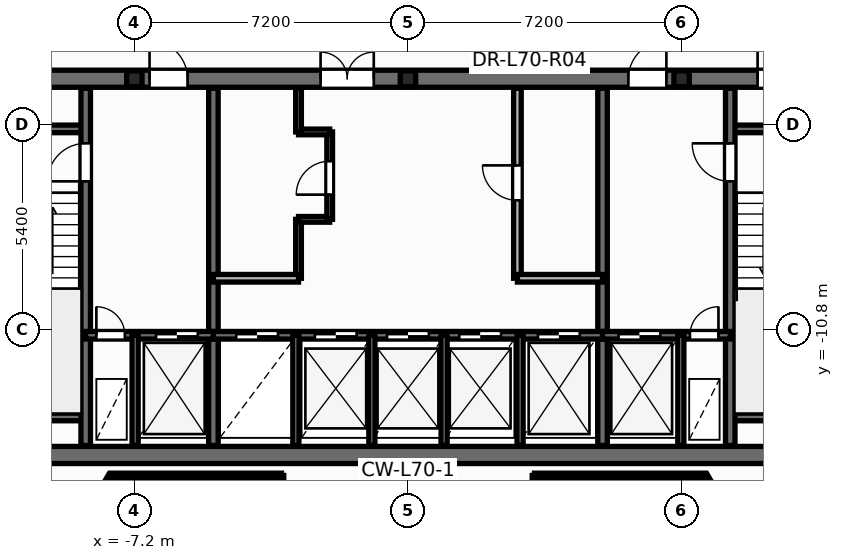
"""IFC4 building model, lengths in metres.
Left out: names, types, materials, properties, quantities, classifications, styles, units other than length and angle.
Written with IfcOpenShell. Run it as: python <this file> out.ifc"""

import sys

from ifc_helpers import new_model, si_unit, direction, frame, frame_2d, origin, origin_2d, place, context, subcontext, project, spatial, rectangle, i_section, extrude, element, fill, save


model = new_model("IFC4")
c1 = context("Model", 3, precision=1e-05, world=origin(), true_north=direction((0.0, 1.0)))
c2 = subcontext(c1, "Body", "Model", "MODEL_VIEW")
j1 = project(units=[si_unit("LENGTHUNIT", "METRE"), si_unit("PLANEANGLEUNIT", "RADIAN")], contexts=[c1])
p1 = place(None, origin())
s1 = spatial("IfcSite", under=j1, at=p1, CompositionType="ELEMENT")
p2 = place(p1, origin())
s2 = spatial("IfcBuilding", under=s1, at=p2, CompositionType="ELEMENT")
p3 = place(p2, frame((0.0, 0.0, 267.0)))
s3 = spatial("IfcBuildingStorey", under=s2, at=p3, CompositionType="ELEMENT", Elevation=267.0)
for number, where, z_axis, x_axis in (
    (1, (-7.2, -4.2, 0.0), (0.0, 0.0, 1.0), (1.0, 0.0, 0.0)),
    (2, (0.0, -4.2, 0.0), (0.0, 0.0, 1.0), (1.0, 0.0, 0.0)),
    (3, (7.2, -4.2, 0.0), (0.0, 0.0, 1.0), (1.0, 0.0, 0.0)),
):
    element("IfcColumn", number, at=place(p3, frame(where, z_axis=z_axis, x_axis=x_axis)), inside=s3, PredefinedType="PILASTER", context=c2, shape_type="SweptSolid", body=[
        extrude(i_section(OverallWidth=0.405, OverallDepth=0.414, WebThickness=0.022, FlangeThickness=0.032, at=origin_2d()), origin(), (0.0, 0.0, 1.0), 3.6),
    ])
p4 = place(p3, frame((-2.88, -9.45, 0.0), z_axis=(0.0, 0.0, 1.0), x_axis=(0.0, 1.0, 0.0)))
e4 = element("IfcWall", 4, at=p4, inside=s3, PredefinedType="PARTITIONING", context=c2, shape_type="SweptSolid", body=[
    extrude(rectangle(XDim=1.55, YDim=0.15, at=frame_2d((0.775, 0.0))), origin(), (0.0, 0.0, 1.0), 3.345),
])
p5 = place(p3, frame((-2.88, -7.9, 0.0), z_axis=(0.0, 0.0, 1.0), x_axis=(1.0, 0.0, 0.0)))
e5 = element("IfcWall", 5, at=p5, inside=s3, PredefinedType="PARTITIONING", context=c2, shape_type="SweptSolid", body=[
    extrude(rectangle(XDim=0.82, YDim=0.15, at=frame_2d((0.41, 0.0))), origin(), (0.0, 0.0, 1.0), 3.345),
])
p6 = place(p3, frame((-2.06, -7.9, 0.0), z_axis=(0.0, 0.0, 1.0), x_axis=(0.0, 1.0, 0.0)))
e6 = element("IfcWall", 6, at=p6, inside=s3, PredefinedType="PARTITIONING", context=c2, shape_type="SweptSolid", body=[
    extrude(rectangle(XDim=2.3, YDim=0.15, at=frame_2d((1.15, 0.0))), origin(), (0.0, 0.0, 1.0), 3.345),
])
p7 = place(p6, frame((0.65, 0.0, 0.0)))
e7 = element("IfcOpeningElement", 7, at=p7, cuts=e6, PredefinedType="OPENING", context=c2, shape_type="SweptSolid", body=[
    extrude(rectangle(XDim=0.886, YDim=2.104, at=frame_2d((0.44, 1.052))), frame((0.0, 0.085, 0.0), z_axis=(0.0, -1.0, 0.0), x_axis=(1.0, 0.0, 0.0)), (0.0, 0.0, 1.0), 0.17),
])
p8 = place(p3, frame((-2.88, -5.6, 0.0), z_axis=(0.0, 0.0, 1.0), x_axis=(1.0, 0.0, 0.0)))
e8 = element("IfcWall", 8, at=p8, inside=s3, PredefinedType="PARTITIONING", context=c2, shape_type="SweptSolid", body=[
    extrude(rectangle(XDim=0.82, YDim=0.15, at=frame_2d((0.41, 0.0))), origin(), (0.0, 0.0, 1.0), 3.345),
])
p9 = place(p3, frame((-2.88, -5.6, 0.0), z_axis=(0.0, 0.0, 1.0), x_axis=(0.0, 1.0, 0.0)))
e9 = element("IfcWall", 9, at=p9, inside=s3, PredefinedType="PARTITIONING", context=c2, shape_type="SweptSolid", body=[
    extrude(rectangle(XDim=1.15, YDim=0.15, at=frame_2d((0.575, 0.0))), origin(), (0.0, 0.0, 1.0), 3.345),
])
p10 = place(p3, frame((-12.65, -14.1, 0.0), z_axis=(0.0, 0.0, 1.0), x_axis=(1.0, 0.0, 0.0)))
e10 = element("IfcWall", 10, at=p10, inside=s3, PredefinedType="SHEAR", context=c2, shape_type="SweptSolid", body=[
    extrude(rectangle(XDim=25.3, YDim=0.45, at=frame_2d((12.65, 0.0))), origin(), (0.0, 0.0, 1.0), 3.6),
])
p11 = place(p3, frame((-12.65, -4.2, 0.0), z_axis=(0.0, 0.0, 1.0), x_axis=(1.0, 0.0, 0.0)))
e11 = element("IfcWall", 11, at=p11, inside=s3, PredefinedType="SHEAR", context=c2, shape_type="SweptSolid", body=[
    extrude(rectangle(XDim=25.3, YDim=0.45, at=frame_2d((12.65, 0.0))), origin(), (0.0, 0.0, 1.0), 3.6),
])
p12 = place(p11, frame((1.85, 0.0, 0.0)))
e12 = element("IfcOpeningElement", 12, at=p12, cuts=e11, PredefinedType="OPENING", context=c2, shape_type="SweptSolid", body=[
    extrude(rectangle(XDim=0.756, YDim=2.054, at=frame_2d((0.375, 1.027))), frame((0.0, 0.235, 0.0), z_axis=(0.0, -1.0, 0.0), x_axis=(1.0, 0.0, 0.0)), (0.0, 0.0, 1.0), 0.47),
])
p13 = place(p11, frame((21.85, 0.0, 0.0)))
e13 = element("IfcOpeningElement", 13, at=p13, cuts=e11, PredefinedType="OPENING", context=c2, shape_type="SweptSolid", body=[
    extrude(rectangle(XDim=0.756, YDim=2.054, at=frame_2d((0.375, 1.027))), frame((0.0, 0.235, 0.0), z_axis=(0.0, -1.0, 0.0), x_axis=(1.0, 0.0, 0.0)), (0.0, 0.0, 1.0), 0.47),
])
p14 = place(p11, frame((23.5, 0.0, 0.0)))
e14 = element("IfcOpeningElement", 14, at=p14, cuts=e11, PredefinedType="OPENING", context=c2, shape_type="SweptSolid", body=[
    extrude(rectangle(XDim=0.756, YDim=2.054, at=frame_2d((0.375, 1.027))), frame((0.0, 0.235, 0.0), z_axis=(0.0, -1.0, 0.0), x_axis=(1.0, 0.0, 0.0)), (0.0, 0.0, 1.0), 0.47),
])
p15 = place(p11, frame((5.85, 0.0, 0.0)))
e15 = element("IfcOpeningElement", 15, at=p15, cuts=e11, PredefinedType="OPENING", context=c2, shape_type="SweptSolid", body=[
    extrude(rectangle(XDim=1.006, YDim=2.104, at=frame_2d((0.5, 1.052))), frame((0.0, 0.235, 0.0), z_axis=(0.0, -1.0, 0.0), x_axis=(1.0, 0.0, 0.0)), (0.0, 0.0, 1.0), 0.47),
])
p16 = place(p11, frame((10.35, 0.0, 0.0)))
e16 = element("IfcOpeningElement", 16, at=p16, cuts=e11, PredefinedType="OPENING", context=c2, shape_type="SweptSolid", body=[
    extrude(rectangle(XDim=1.406, YDim=2.154, at=frame_2d((0.7, 1.077))), frame((0.0, 0.235, 0.0), z_axis=(0.0, -1.0, 0.0), x_axis=(1.0, 0.0, 0.0)), (0.0, 0.0, 1.0), 0.47),
])
p17 = place(p11, frame((18.45, 0.0, 0.0)))
e17 = element("IfcOpeningElement", 17, at=p17, cuts=e11, PredefinedType="OPENING", context=c2, shape_type="SweptSolid", body=[
    extrude(rectangle(XDim=1.006, YDim=2.104, at=frame_2d((0.5, 1.052))), frame((0.0, 0.235, 0.0), z_axis=(0.0, -1.0, 0.0), x_axis=(1.0, 0.0, 0.0)), (0.0, 0.0, 1.0), 0.47),
])
for number, where, z_axis, x_axis in (
    (18, (-12.35, -5.52, 0.0), (0.0, 0.0, 1.0), (1.0, 0.0, 0.0)),
    (19, (-12.35, -13.1, 0.0), (0.0, 0.0, 1.0), (1.0, 0.0, 0.0)),
    (20, (8.48, -5.52, 0.0), (0.0, 0.0, 1.0), (1.0, 0.0, 0.0)),
    (21, (8.48, -13.1, 0.0), (0.0, 0.0, 1.0), (1.0, 0.0, 0.0)),
):
    element("IfcWall", number, at=place(p3, frame(where, z_axis=z_axis, x_axis=x_axis)), inside=s3, PredefinedType="SOLIDWALL", context=c2, shape_type="SweptSolid", body=[
        extrude(rectangle(XDim=3.87, YDim=0.2, at=frame_2d((1.935, 0.0))), origin(), (0.0, 0.0, 1.0), 3.6),
    ])
p18 = place(p3, frame((-8.48, -13.85, 0.0), z_axis=(0.0, 0.0, 1.0), x_axis=(0.0, 1.0, 0.0)))
e22 = element("IfcWall", 22, at=p18, inside=s3, PredefinedType="SHEAR", context=c2, shape_type="SweptSolid", body=[
    extrude(rectangle(XDim=9.4, YDim=0.25, at=frame_2d((4.7, 0.0))), origin(), (0.0, 0.0, 1.0), 3.6),
])
p19 = place(p18, frame((6.95, 0.0, 0.0)))
e23 = element("IfcOpeningElement", 23, at=p19, cuts=e22, PredefinedType="OPENING", context=c2, shape_type="SweptSolid", body=[
    extrude(rectangle(XDim=1.006, YDim=2.104, at=frame_2d((0.5, 1.052))), frame((0.0, 0.135, 0.0), z_axis=(0.0, -1.0, 0.0), x_axis=(1.0, 0.0, 0.0)), (0.0, 0.0, 1.0), 0.27),
])
p20 = place(p3, frame((8.48, -13.85, 0.0), z_axis=(0.0, 0.0, 1.0), x_axis=(0.0, 1.0, 0.0)))
e24 = element("IfcWall", 24, at=p20, inside=s3, PredefinedType="SHEAR", context=c2, shape_type="SweptSolid", body=[
    extrude(rectangle(XDim=9.4, YDim=0.25, at=frame_2d((4.7, 0.0))), origin(), (0.0, 0.0, 1.0), 3.6),
])
p21 = place(p20, frame((6.95, 0.0, 0.0)))
e25 = element("IfcOpeningElement", 25, at=p21, cuts=e24, PredefinedType="OPENING", context=c2, shape_type="SweptSolid", body=[
    extrude(rectangle(XDim=1.006, YDim=2.104, at=frame_2d((0.5, 1.052))), frame((0.0, 0.135, 0.0), z_axis=(0.0, -1.0, 0.0), x_axis=(1.0, 0.0, 0.0)), (0.0, 0.0, 1.0), 0.27),
])
for number, where, z_axis, x_axis in (
    (26, (-5.12, -13.85, 0.0), (0.0, 0.0, 1.0), (0.0, 1.0, 0.0)),
    (27, (5.12, -13.85, 0.0), (0.0, 0.0, 1.0), (0.0, 1.0, 0.0)),
):
    element("IfcWall", number, at=place(p3, frame(where, z_axis=z_axis, x_axis=x_axis)), inside=s3, PredefinedType="SHEAR", context=c2, shape_type="SweptSolid", body=[
        extrude(rectangle(XDim=9.4, YDim=0.25, at=frame_2d((4.7, 0.0))), origin(), (0.0, 0.0, 1.0), 3.6),
    ])
p22 = place(p3, frame((-8.48, -10.95, 0.0), z_axis=(0.0, 0.0, 1.0), x_axis=(1.0, 0.0, 0.0)))
e28 = element("IfcWall", 28, at=p22, inside=s3, PredefinedType="SOLIDWALL", context=c2, shape_type="SweptSolid", body=[
    extrude(rectangle(XDim=3.36, YDim=0.2, at=frame_2d((1.68, 0.0))), origin(), (0.0, 0.0, 1.0), 3.6),
])
p23 = place(p22, frame((0.28, 0.0, 0.0)))
e29 = element("IfcOpeningElement", 29, at=p23, cuts=e28, PredefinedType="OPENING", context=c2, shape_type="SweptSolid", body=[
    extrude(rectangle(XDim=0.756, YDim=2.054, at=frame_2d((0.375, 1.027))), frame((0.0, 0.11, 0.0), z_axis=(0.0, -1.0, 0.0), x_axis=(1.0, 0.0, 0.0)), (0.0, 0.0, 1.0), 0.22),
])
p24 = place(p22, frame((1.85, 0.0, 0.0)))
e30 = element("IfcOpeningElement", 30, at=p24, cuts=e28, PredefinedType="OPENING", context=c2, shape_type="SweptSolid", body=[
    extrude(rectangle(XDim=1.106, YDim=2.104, at=frame_2d((0.55, 1.052))), frame((0.0, 0.11, 0.0), z_axis=(0.0, -1.0, 0.0), x_axis=(1.0, 0.0, 0.0)), (0.0, 0.0, 1.0), 0.22),
])
p25 = place(p3, frame((-5.12, -10.95, 0.0), z_axis=(0.0, 0.0, 1.0), x_axis=(1.0, 0.0, 0.0)))
e31 = element("IfcWall", 31, at=p25, inside=s3, PredefinedType="SOLIDWALL", context=c2, shape_type="SweptSolid", body=[
    extrude(rectangle(XDim=10.24, YDim=0.2, at=frame_2d((5.12, 0.0))), origin(), (0.0, 0.0, 1.0), 3.6),
])
p26 = place(p25, frame((0.6, 0.0, 0.0)))
e32 = element("IfcOpeningElement", 32, at=p26, cuts=e31, PredefinedType="OPENING", context=c2, shape_type="SweptSolid", body=[
    extrude(rectangle(XDim=1.106, YDim=2.104, at=frame_2d((0.55, 1.052))), frame((0.0, 0.11, 0.0), z_axis=(0.0, -1.0, 0.0), x_axis=(1.0, 0.0, 0.0)), (0.0, 0.0, 1.0), 0.22),
])
p27 = place(p25, frame((2.67, 0.0, 0.0)))
e33 = element("IfcOpeningElement", 33, at=p27, cuts=e31, PredefinedType="OPENING", context=c2, shape_type="SweptSolid", body=[
    extrude(rectangle(XDim=1.106, YDim=2.104, at=frame_2d((0.55, 1.052))), frame((0.0, 0.11, 0.0), z_axis=(0.0, -1.0, 0.0), x_axis=(1.0, 0.0, 0.0)), (0.0, 0.0, 1.0), 0.22),
])
p28 = place(p25, frame((4.57, 0.0, 0.0)))
e34 = element("IfcOpeningElement", 34, at=p28, cuts=e31, PredefinedType="OPENING", context=c2, shape_type="SweptSolid", body=[
    extrude(rectangle(XDim=1.106, YDim=2.104, at=frame_2d((0.55, 1.052))), frame((0.0, 0.11, 0.0), z_axis=(0.0, -1.0, 0.0), x_axis=(1.0, 0.0, 0.0)), (0.0, 0.0, 1.0), 0.22),
])
p29 = place(p25, frame((6.47, 0.0, 0.0)))
e35 = element("IfcOpeningElement", 35, at=p29, cuts=e31, PredefinedType="OPENING", context=c2, shape_type="SweptSolid", body=[
    extrude(rectangle(XDim=1.106, YDim=2.104, at=frame_2d((0.55, 1.052))), frame((0.0, 0.11, 0.0), z_axis=(0.0, -1.0, 0.0), x_axis=(1.0, 0.0, 0.0)), (0.0, 0.0, 1.0), 0.22),
])
p30 = place(p25, frame((8.54, 0.0, 0.0)))
e36 = element("IfcOpeningElement", 36, at=p30, cuts=e31, PredefinedType="OPENING", context=c2, shape_type="SweptSolid", body=[
    extrude(rectangle(XDim=1.106, YDim=2.104, at=frame_2d((0.55, 1.052))), frame((0.0, 0.11, 0.0), z_axis=(0.0, -1.0, 0.0), x_axis=(1.0, 0.0, 0.0)), (0.0, 0.0, 1.0), 0.22),
])
p31 = place(p3, frame((5.12, -10.95, 0.0), z_axis=(0.0, 0.0, 1.0), x_axis=(1.0, 0.0, 0.0)))
e37 = element("IfcWall", 37, at=p31, inside=s3, PredefinedType="SOLIDWALL", context=c2, shape_type="SweptSolid", body=[
    extrude(rectangle(XDim=3.36, YDim=0.2, at=frame_2d((1.68, 0.0))), origin(), (0.0, 0.0, 1.0), 3.6),
])
p32 = place(p31, frame((0.42, 0.0, 0.0)))
e38 = element("IfcOpeningElement", 38, at=p32, cuts=e37, PredefinedType="OPENING", context=c2, shape_type="SweptSolid", body=[
    extrude(rectangle(XDim=1.106, YDim=2.104, at=frame_2d((0.55, 1.052))), frame((0.0, 0.11, 0.0), z_axis=(0.0, -1.0, 0.0), x_axis=(1.0, 0.0, 0.0)), (0.0, 0.0, 1.0), 0.22),
])
p33 = place(p31, frame((2.3, 0.0, 0.0)))
e39 = element("IfcOpeningElement", 39, at=p33, cuts=e37, PredefinedType="OPENING", context=c2, shape_type="SweptSolid", body=[
    extrude(rectangle(XDim=0.756, YDim=2.054, at=frame_2d((0.375, 1.027))), frame((0.0, 0.11, 0.0), z_axis=(0.0, -1.0, 0.0), x_axis=(1.0, 0.0, 0.0)), (0.0, 0.0, 1.0), 0.22),
])
for number, where, z_axis, x_axis in (
    (40, (-7.18, -13.85, 0.0), (0.0, 0.0, 1.0), (0.0, 1.0, 0.0)),
    (41, (7.18, -13.85, 0.0), (0.0, 0.0, 1.0), (0.0, 1.0, 0.0)),
    (42, (-2.95, -13.85, 0.0), (0.0, 0.0, 1.0), (0.0, 1.0, 0.0)),
    (43, (2.95, -13.85, 0.0), (0.0, 0.0, 1.0), (0.0, 1.0, 0.0)),
):
    element("IfcWall", number, at=place(p3, frame(where, z_axis=z_axis, x_axis=x_axis)), inside=s3, PredefinedType="PARTITIONING", context=c2, shape_type="SweptSolid", body=[
        extrude(rectangle(XDim=2.9, YDim=0.16, at=frame_2d((1.45, 0.0))), origin(), (0.0, 0.0, 1.0), 2.57),
    ])
p34 = place(p3, frame((-5.12, -9.45, 0.0), z_axis=(0.0, 0.0, 1.0), x_axis=(1.0, 0.0, 0.0)))
e44 = element("IfcWall", 44, at=p34, inside=s3, PredefinedType="SOLIDWALL", context=c2, shape_type="SweptSolid", body=[
    extrude(rectangle(XDim=2.24, YDim=0.2, at=frame_2d((1.12, 0.0))), origin(), (0.0, 0.0, 1.0), 3.345),
])
p35 = place(p3, frame((2.88, -9.45, 0.0), z_axis=(0.0, 0.0, 1.0), x_axis=(0.0, 1.0, 0.0)))
e45 = element("IfcWall", 45, at=p35, inside=s3, PredefinedType="SOLIDWALL", context=c2, shape_type="SweptSolid", body=[
    extrude(rectangle(XDim=5.0, YDim=0.2, at=frame_2d((2.5, 0.0))), origin(), (0.0, 0.0, 1.0), 3.345),
])
p36 = place(p35, frame((2.05, 0.0, 0.0)))
e46 = element("IfcOpeningElement", 46, at=p36, cuts=e45, PredefinedType="OPENING", context=c2, shape_type="SweptSolid", body=[
    extrude(rectangle(XDim=0.926, YDim=2.104, at=frame_2d((0.46, 1.052))), frame((0.0, 0.11, 0.0), z_axis=(0.0, -1.0, 0.0), x_axis=(1.0, 0.0, 0.0)), (0.0, 0.0, 1.0), 0.22),
])
p37 = place(p3, frame((2.88, -9.45, 0.0), z_axis=(0.0, 0.0, 1.0), x_axis=(1.0, 0.0, 0.0)))
e47 = element("IfcWall", 47, at=p37, inside=s3, PredefinedType="SOLIDWALL", context=c2, shape_type="SweptSolid", body=[
    extrude(rectangle(XDim=2.24, YDim=0.2, at=frame_2d((1.12, 0.0))), origin(), (0.0, 0.0, 1.0), 3.345),
])
for number, where, z_axis, x_axis in (
    (48, (-0.95, -13.85, 0.0), (0.0, 0.0, 1.0), (0.0, 1.0, 0.0)),
    (49, (0.95, -13.85, 0.0), (0.0, 0.0, 1.0), (0.0, 1.0, 0.0)),
):
    element("IfcWall", number, at=place(p3, frame(where, z_axis=z_axis, x_axis=x_axis)), inside=s3, PredefinedType="PARTITIONING", context=c2, shape_type="SweptSolid", body=[
        extrude(rectangle(XDim=2.9, YDim=0.16, at=frame_2d((1.45, 0.0))), origin(), (0.0, 0.0, 1.0), 2.57),
    ])
for number, where, z_axis, x_axis in (
    (50, (-7.822, -14.639, 0.0), (0.0, 0.0, 1.0), (1.0, 0.0, 0.0)),
    (51, (3.329, -14.639, 0.0), (0.0, 0.0, 1.0), (1.0, 0.0, 0.0)),
):
    element("IfcWall", number, at=place(p3, frame(where, z_axis=z_axis, x_axis=x_axis)), inside=s3, PredefinedType="PARTITIONING", context=c2, shape_type="SweptSolid", body=[
        extrude(rectangle(XDim=4.493, YDim=0.12, at=frame_2d((2.247, 0.0))), origin(), (0.0, 0.0, 1.0), 3.345),
    ])
for number, where, z_axis, x_axis in (
    (52, (-8.214, -15.309, 0.0), (0.0, 0.0, 1.0), (0.505, 0.863, 0.0)),
    (53, (7.822, -14.639, 0.0), (0.0, 0.0, 1.0), (0.505, -0.863, 0.0)),
):
    element("IfcWall", number, at=place(p3, frame(where, z_axis=z_axis, x_axis=x_axis)), inside=s3, PredefinedType="PARTITIONING", context=c2, shape_type="SweptSolid", body=[
        extrude(rectangle(XDim=0.776, YDim=0.12, at=frame_2d((0.388, 0.0))), origin(), (0.0, 0.0, 1.0), 2.863),
    ])
for number, where, z_axis, x_axis in (
    (54, (-3.329, -14.639, 0.0), (0.0, 0.0, 1.0), (0.0, -1.0, 0.0)),
    (55, (3.329, -15.309, 0.0), (0.0, 0.0, 1.0), (0.0, 1.0, 0.0)),
):
    element("IfcWall", number, at=place(p3, frame(where, z_axis=z_axis, x_axis=x_axis)), inside=s3, PredefinedType="PARTITIONING", context=c2, shape_type="SweptSolid", body=[
        extrude(rectangle(XDim=0.67, YDim=0.12, at=frame_2d((0.335, 0.0))), origin(), (0.0, 0.0, 1.0), 2.863),
    ])
p38 = place(p7, origin())
e56 = element("IfcDoor", 56, at=p38, inside=s3, OperationType="SINGLE_SWING_LEFT", PredefinedType="DOOR", context=c2, shape_type="SweptSolid", body=[
    extrude(rectangle(XDim=0.88, YDim=2.1, at=frame_2d((0.44, 1.05))), frame((0.0, 0.025, 0.0), z_axis=(0.0, -1.0, 0.0), x_axis=(1.0, 0.0, 0.0)), (0.0, 0.0, 1.0), 0.05),
])
fill(e7, e56)
p39 = place(p36, origin())
e57 = element("IfcDoor", 57, at=p39, inside=s3, OperationType="SINGLE_SWING_RIGHT", PredefinedType="DOOR", context=c2, shape_type="SweptSolid", body=[
    extrude(rectangle(XDim=0.92, YDim=2.1, at=frame_2d((0.46, 1.05))), frame((0.0, 0.025, 0.0), z_axis=(0.0, -1.0, 0.0), x_axis=(1.0, 0.0, 0.0)), (0.0, 0.0, 1.0), 0.05),
])
fill(e46, e57)
p40 = place(p19, origin())
e58 = element("IfcDoor", 58, at=p40, inside=s3, OperationType="SINGLE_SWING_LEFT", PredefinedType="DOOR", context=c2, shape_type="SweptSolid", body=[
    extrude(rectangle(XDim=1.0, YDim=2.1, at=frame_2d((0.5, 1.05))), frame((0.0, 0.025, 0.0), z_axis=(0.0, -1.0, 0.0), x_axis=(1.0, 0.0, 0.0)), (0.0, 0.0, 1.0), 0.05),
])
fill(e23, e58)
p41 = place(p21, origin())
e59 = element("IfcDoor", 59, at=p41, inside=s3, OperationType="SINGLE_SWING_RIGHT", PredefinedType="DOOR", context=c2, shape_type="SweptSolid", body=[
    extrude(rectangle(XDim=1.0, YDim=2.1, at=frame_2d((0.5, 1.05))), frame((0.0, 0.025, 0.0), z_axis=(0.0, -1.0, 0.0), x_axis=(1.0, 0.0, 0.0)), (0.0, 0.0, 1.0), 0.05),
])
fill(e25, e59)
p42 = place(p23, origin())
e60 = element("IfcDoor", 60, at=p42, inside=s3, OperationType="SINGLE_SWING_LEFT", PredefinedType="DOOR", context=c2, shape_type="SweptSolid", body=[
    extrude(rectangle(XDim=0.75, YDim=2.05, at=frame_2d((0.375, 1.025))), frame((0.0, 0.025, 0.0), z_axis=(0.0, -1.0, 0.0), x_axis=(1.0, 0.0, 0.0)), (0.0, 0.0, 1.0), 0.05),
])
fill(e29, e60)
p43 = place(p24, origin())
e61 = element("IfcDoor", 61, at=p43, inside=s3, OperationType="DOUBLE_DOOR_SLIDING", PredefinedType="DOOR", context=c2, shape_type="SweptSolid", body=[
    extrude(rectangle(XDim=1.1, YDim=2.1, at=frame_2d((0.55, 1.05))), frame((0.0, 0.025, 0.0), z_axis=(0.0, -1.0, 0.0), x_axis=(1.0, 0.0, 0.0)), (0.0, 0.0, 1.0), 0.05),
])
fill(e30, e61)
p44 = place(p32, origin())
e62 = element("IfcDoor", 62, at=p44, inside=s3, OperationType="DOUBLE_DOOR_SLIDING", PredefinedType="DOOR", context=c2, shape_type="SweptSolid", body=[
    extrude(rectangle(XDim=1.1, YDim=2.1, at=frame_2d((0.55, 1.05))), frame((0.0, 0.025, 0.0), z_axis=(0.0, -1.0, 0.0), x_axis=(1.0, 0.0, 0.0)), (0.0, 0.0, 1.0), 0.05),
])
fill(e38, e62)
p45 = place(p33, origin())
e63 = element("IfcDoor", 63, at=p45, inside=s3, OperationType="SINGLE_SWING_RIGHT", PredefinedType="DOOR", context=c2, shape_type="SweptSolid", body=[
    extrude(rectangle(XDim=0.75, YDim=2.05, at=frame_2d((0.375, 1.025))), frame((0.0, 0.025, 0.0), z_axis=(0.0, -1.0, 0.0), x_axis=(1.0, 0.0, 0.0)), (0.0, 0.0, 1.0), 0.05),
])
fill(e39, e63)
p46 = place(p26, origin())
e64 = element("IfcDoor", 64, at=p46, inside=s3, OperationType="DOUBLE_DOOR_SLIDING", PredefinedType="DOOR", context=c2, shape_type="SweptSolid", body=[
    extrude(rectangle(XDim=1.1, YDim=2.1, at=frame_2d((0.55, 1.05))), frame((0.0, 0.025, 0.0), z_axis=(0.0, -1.0, 0.0), x_axis=(1.0, 0.0, 0.0)), (0.0, 0.0, 1.0), 0.05),
])
fill(e32, e64)
p47 = place(p27, origin())
e65 = element("IfcDoor", 65, at=p47, inside=s3, OperationType="DOUBLE_DOOR_SLIDING", PredefinedType="DOOR", context=c2, shape_type="SweptSolid", body=[
    extrude(rectangle(XDim=1.1, YDim=2.1, at=frame_2d((0.55, 1.05))), frame((0.0, 0.025, 0.0), z_axis=(0.0, -1.0, 0.0), x_axis=(1.0, 0.0, 0.0)), (0.0, 0.0, 1.0), 0.05),
])
fill(e33, e65)
p48 = place(p28, origin())
e66 = element("IfcDoor", 66, at=p48, inside=s3, OperationType="DOUBLE_DOOR_SLIDING", PredefinedType="DOOR", context=c2, shape_type="SweptSolid", body=[
    extrude(rectangle(XDim=1.1, YDim=2.1, at=frame_2d((0.55, 1.05))), frame((0.0, 0.025, 0.0), z_axis=(0.0, -1.0, 0.0), x_axis=(1.0, 0.0, 0.0)), (0.0, 0.0, 1.0), 0.05),
])
fill(e34, e66)
p49 = place(p29, origin())
e67 = element("IfcDoor", 67, at=p49, inside=s3, OperationType="DOUBLE_DOOR_SLIDING", PredefinedType="DOOR", context=c2, shape_type="SweptSolid", body=[
    extrude(rectangle(XDim=1.1, YDim=2.1, at=frame_2d((0.55, 1.05))), frame((0.0, 0.025, 0.0), z_axis=(0.0, -1.0, 0.0), x_axis=(1.0, 0.0, 0.0)), (0.0, 0.0, 1.0), 0.05),
])
fill(e35, e67)
p50 = place(p30, origin())
e68 = element("IfcDoor", 68, at=p50, inside=s3, OperationType="DOUBLE_DOOR_SLIDING", PredefinedType="DOOR", context=c2, shape_type="SweptSolid", body=[
    extrude(rectangle(XDim=1.1, YDim=2.1, at=frame_2d((0.55, 1.05))), frame((0.0, 0.025, 0.0), z_axis=(0.0, -1.0, 0.0), x_axis=(1.0, 0.0, 0.0)), (0.0, 0.0, 1.0), 0.05),
])
fill(e36, e68)
p51 = place(p13, origin())
e69 = element("IfcDoor", 69, at=p51, inside=s3, OperationType="SINGLE_SWING_LEFT", PredefinedType="DOOR", context=c2, shape_type="SweptSolid", body=[
    extrude(rectangle(XDim=0.75, YDim=2.05, at=frame_2d((0.375, 1.025))), frame((0.0, 0.025, 0.0), z_axis=(0.0, -1.0, 0.0), x_axis=(1.0, 0.0, 0.0)), (0.0, 0.0, 1.0), 0.05),
])
fill(e13, e69)
p52 = place(p15, origin())
e70 = element("IfcDoor", 70, at=p52, inside=s3, OperationType="SINGLE_SWING_LEFT", PredefinedType="DOOR", context=c2, shape_type="SweptSolid", body=[
    extrude(rectangle(XDim=1.0, YDim=2.1, at=frame_2d((0.5, 1.05))), frame((0.0, 0.025, 0.0), z_axis=(0.0, -1.0, 0.0), x_axis=(1.0, 0.0, 0.0)), (0.0, 0.0, 1.0), 0.05),
])
fill(e15, e70)
p53 = place(p16, origin())
e71 = element("IfcDoor", 71, at=p53, inside=s3, OperationType="DOUBLE_DOOR_SINGLE_SWING", PredefinedType="DOOR", context=c2, shape_type="SweptSolid", body=[
    extrude(rectangle(XDim=1.4, YDim=2.15, at=frame_2d((0.7, 1.075))), frame((0.0, 0.025, 0.0), z_axis=(0.0, -1.0, 0.0), x_axis=(1.0, 0.0, 0.0)), (0.0, 0.0, 1.0), 0.05),
])
fill(e16, e71)
p54 = place(p17, origin())
e72 = element("IfcDoor", 72, at=p54, inside=s3, OperationType="SINGLE_SWING_RIGHT", PredefinedType="DOOR", context=c2, shape_type="SweptSolid", body=[
    extrude(rectangle(XDim=1.0, YDim=2.1, at=frame_2d((0.5, 1.05))), frame((0.0, 0.025, 0.0), z_axis=(0.0, -1.0, 0.0), x_axis=(1.0, 0.0, 0.0)), (0.0, 0.0, 1.0), 0.05),
])
fill(e17, e72)
save(model, sys.argv[1])
